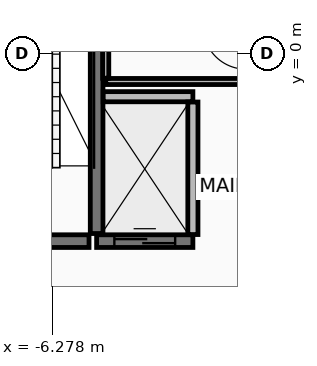
"""IFC4 building model, lengths in metres.
Left out: names, types, materials, properties, quantities, classifications, styles, units other than length and angle.
Written with IfcOpenShell. Run it as: python <this file> out.ifc"""

import sys

from ifc_helpers import new_model, si_unit, direction, frame, frame_2d, origin, place, context, subcontext, project, spatial, rectangle, extrude, element, fill, save


model = new_model("IFC4")
c1 = context("Model", 3, precision=1e-05, world=origin(), true_north=direction((0.0, 1.0)))
c2 = subcontext(c1, "Body", "Model", "MODEL_VIEW")
j1 = project(units=[si_unit("LENGTHUNIT", "METRE"), si_unit("PLANEANGLEUNIT", "RADIAN")], contexts=[c1])
p1 = place(None, origin())
s1 = spatial("IfcSite", under=j1, at=p1, CompositionType="ELEMENT")
p2 = place(p1, origin())
s2 = spatial("IfcBuilding", under=s1, at=p2, CompositionType="ELEMENT")
p3 = place(p2, frame((0.0, 0.0, 116.05)))
s3 = spatial("IfcBuildingStorey", under=s2, at=p3, CompositionType="ELEMENT", Elevation=116.05)
p4 = place(p3, frame((-5.4, -3.55, 0.0), z_axis=(0.0, 0.0, 1.0), x_axis=(0.0, 1.0, 0.0)))
e1 = element("IfcWall", 1, at=p4, inside=s3, PredefinedType="SHEAR", context=c2, shape_type="SweptSolid", body=[
    extrude(rectangle(XDim=7.3, YDim=0.25, at=frame_2d((3.65, 0.0))), origin(), (0.0, 0.0, 1.0), 3.41),
])
p5 = place(p3, frame((-8.5, -3.7, 0.0), z_axis=(0.0, 0.0, 1.0), x_axis=(1.0, 0.0, 0.0)))
e2 = element("IfcWall", 2, at=p5, inside=s3, PredefinedType="SHEAR", context=c2, shape_type="SweptSolid", body=[
    extrude(rectangle(XDim=2.95, YDim=0.25, at=frame_2d((1.475, 0.0))), origin(), (0.0, 0.0, 1.0), 3.41),
])
p6 = place(p5, frame((0.9, 0.0, 0.0)))
e3 = element("IfcOpeningElement", 3, at=p6, cuts=e2, PredefinedType="OPENING", context=c2, shape_type="SweptSolid", body=[
    extrude(rectangle(XDim=1.1, YDim=2.15, at=frame_2d((0.55, 1.075))), frame((0.0, 0.135, 0.0), z_axis=(0.0, -1.0, 0.0), x_axis=(1.0, 0.0, 0.0)), (0.0, 0.0, 1.0), 0.27),
])
p7 = place(p3, frame((-5.4, -3.7, 0.0), z_axis=(0.0, 0.0, 1.0), x_axis=(1.0, 0.0, 0.0)))
e4 = element("IfcWall", 4, at=p7, inside=s3, PredefinedType="SHEAR", context=c2, shape_type="SweptSolid", body=[
    extrude(rectangle(XDim=1.9, YDim=0.25, at=frame_2d((0.95, 0.0))), origin(), (0.0, 0.0, 1.0), 3.41),
])
p8 = place(p7, frame((0.35, 0.0, 0.0)))
e5 = element("IfcOpeningElement", 5, at=p8, cuts=e4, PredefinedType="OPENING", context=c2, shape_type="SweptSolid", body=[
    extrude(rectangle(XDim=1.2, YDim=2.2, at=frame_2d((0.6, 1.1))), frame((0.0, 0.135, 0.0), z_axis=(0.0, -1.0, 0.0), x_axis=(1.0, 0.0, 0.0)), (0.0, 0.0, 1.0), 0.27),
])
p9 = place(p3, frame((-5.27, -0.85, 0.0), z_axis=(0.0, 0.0, 1.0), x_axis=(1.0, 0.0, 0.0)))
e6 = element("IfcWall", 6, at=p9, inside=s3, PredefinedType="PARTITIONING", context=c2, shape_type="SweptSolid", body=[
    extrude(rectangle(XDim=1.77, YDim=0.2, at=frame_2d((0.885, 0.0))), origin(), (0.0, 0.0, 1.0), 3.41),
])
p10 = place(p3, frame((-3.5, -3.57, 0.0), z_axis=(0.0, 0.0, 1.0), x_axis=(0.0, 1.0, 0.0)))
e7 = element("IfcWall", 7, at=p10, inside=s3, PredefinedType="PARTITIONING", context=c2, shape_type="SweptSolid", body=[
    extrude(rectangle(XDim=2.615, YDim=0.2, at=frame_2d((1.308, 0.0))), origin(), (0.0, 0.0, 1.0), 3.41),
])
p11 = place(p3, frame((-5.22, -0.55, 0.0), z_axis=(0.0, 0.0, 1.0), x_axis=(1.0, 0.0, 0.0)))
e8 = element("IfcWall", 8, at=p11, inside=s3, PredefinedType="PARTITIONING", context=c2, shape_type="SweptSolid", body=[
    extrude(rectangle(XDim=2.77, YDim=0.12, at=frame_2d((1.385, 0.0))), origin(), (0.0, 0.0, 1.0), 3.41),
])
p12 = place(p3, frame((-5.22, 0.655, 0.0), z_axis=(0.0, 0.0, 1.0), x_axis=(0.0, -1.0, 0.0)))
e9 = element("IfcWall", 9, at=p12, inside=s3, PredefinedType="PARTITIONING", context=c2, shape_type="SweptSolid", body=[
    extrude(rectangle(XDim=1.14, YDim=0.12, at=frame_2d((0.57, 0.0))), origin(), (0.0, 0.0, 1.0), 3.41),
])
p13 = place(p8, origin())
e10 = element("IfcDoor", 10, at=p13, inside=s3, OperationType="SLIDING_TO_RIGHT", PredefinedType="DOOR", context=c2, shape_type="SweptSolid", body=[
    extrude(rectangle(XDim=1.2, YDim=2.2, at=frame_2d((0.6, 1.1))), frame((0.0, 0.025, 0.0), z_axis=(0.0, -1.0, 0.0), x_axis=(1.0, 0.0, 0.0)), (0.0, 0.0, 1.0), 0.05),
])
fill(e5, e10)
save(model, sys.argv[1])
